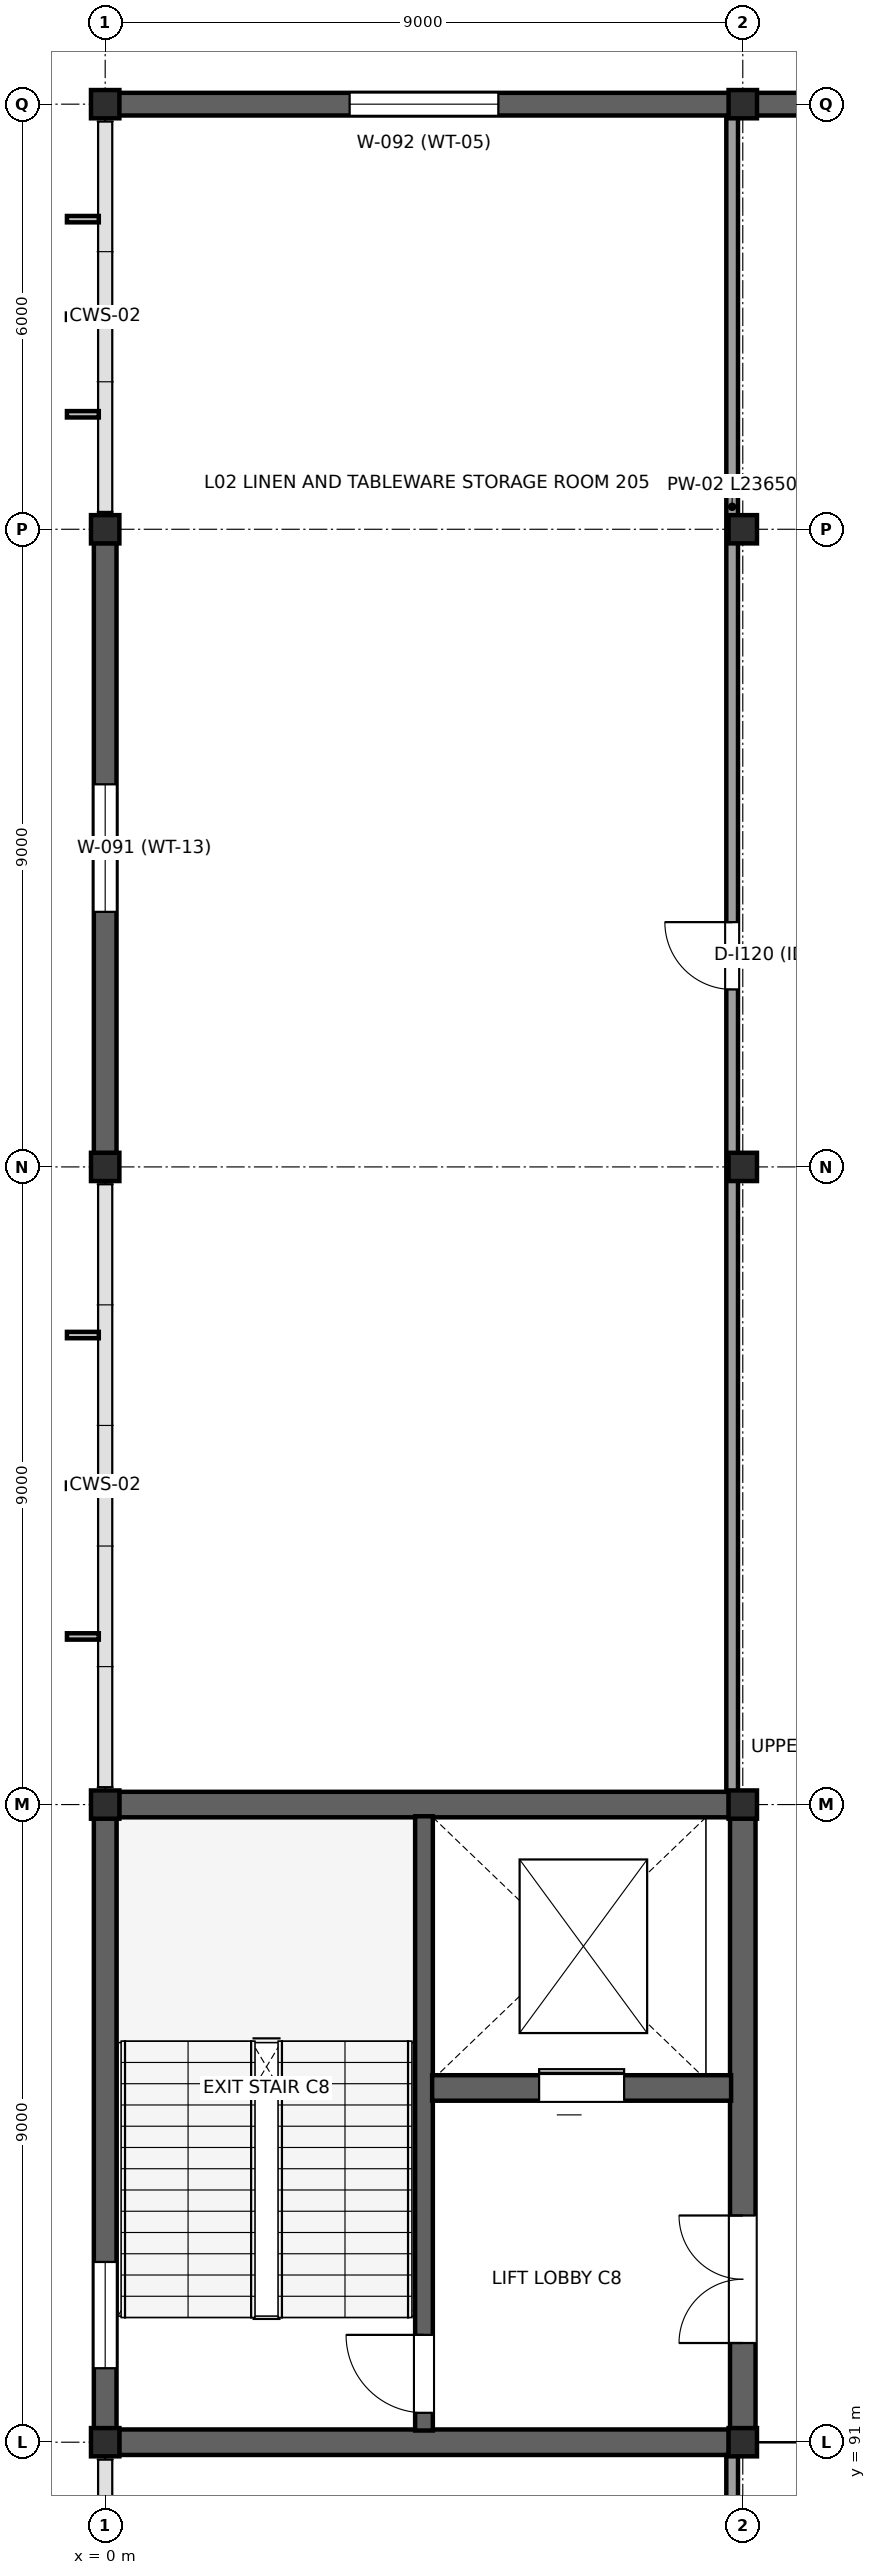
"""IFC4 building model, lengths in metres.
Left out: names, types, materials, properties, quantities, classifications, styles, units other than length and angle.
Written with IfcOpenShell. Run it as: python <this file> out.ifc"""

import sys

from ifc_helpers import new_model, si_unit, direction, frame, frame_2d, origin, origin_2d, place, context, subcontext, project, spatial, rectangle, i_section, extrude, element, fill, save


model = new_model("IFC4")
c1 = context("Model", 3, precision=1e-05, world=origin(), true_north=direction((0.0, 1.0)))
c2 = subcontext(c1, "Body", "Model", "MODEL_VIEW")
j1 = project(units=[si_unit("LENGTHUNIT", "METRE"), si_unit("PLANEANGLEUNIT", "RADIAN")], contexts=[c1])
p1 = place(None, origin())
s1 = spatial("IfcSite", under=j1, at=p1, CompositionType="ELEMENT")
p2 = place(p1, origin())
s2 = spatial("IfcBuilding", under=s1, at=p2, CompositionType="ELEMENT")
p3 = place(p2, frame((0.0, 0.0, 12.0)))
s3 = spatial("IfcBuildingStorey", under=s2, at=p3, CompositionType="ELEMENT", Elevation=12.0)
for number, where, z_axis, x_axis in (
    (1, (0.0, 91.0, 0.0), (0.0, 0.0, 1.0), (1.0, 0.0, 0.0)),
    (2, (0.0, 100.0, 0.0), (0.0, 0.0, 1.0), (1.0, 0.0, 0.0)),
    (3, (0.0, 109.0, 0.0), (0.0, 0.0, 1.0), (1.0, 0.0, 0.0)),
    (4, (0.0, 118.0, 0.0), (0.0, 0.0, 1.0), (1.0, 0.0, 0.0)),
    (5, (0.0, 124.0, 0.0), (0.0, 0.0, 1.0), (1.0, 0.0, 0.0)),
    (6, (9.0, 91.0, 0.0), (0.0, 0.0, 1.0), (1.0, 0.0, 0.0)),
    (7, (9.0, 100.0, 0.0), (0.0, 0.0, 1.0), (1.0, 0.0, 0.0)),
    (8, (9.0, 109.0, 0.0), (0.0, 0.0, 1.0), (1.0, 0.0, 0.0)),
    (9, (9.0, 118.0, 0.0), (0.0, 0.0, 1.0), (1.0, 0.0, 0.0)),
    (10, (9.0, 124.0, 0.0), (0.0, 0.0, 1.0), (1.0, 0.0, 0.0)),
):
    element("IfcColumn", number, at=place(p3, frame(where, z_axis=z_axis, x_axis=x_axis)), inside=s3, PredefinedType="COLUMN", context=c2, shape_type="SweptSolid", body=[
        extrude(i_section(OverallWidth=0.401, OverallDepth=0.399, WebThickness=0.025, FlangeThickness=0.04, at=origin_2d()), origin(), (0.0, 0.0, 1.0), 4.5),
    ])
p4 = place(p3, frame((0.0, 91.194, 0.0), z_axis=(0.0, 0.0, 1.0), x_axis=(0.0, 1.0, 0.0)))
e11 = element("IfcWall", 11, at=p4, inside=s3, PredefinedType="STANDARD", context=c2, shape_type="SweptSolid", body=[
    extrude(rectangle(XDim=8.612, YDim=0.32, at=frame_2d((4.306, 0.0))), origin(), (0.0, 0.0, 1.0), 4.28),
])
p5 = place(p4, frame((0.85, 0.0, 1.1)))
e12 = element("IfcOpeningElement", 12, at=p5, cuts=e11, PredefinedType="OPENING", context=c2, shape_type="SweptSolid", body=[
    extrude(rectangle(XDim=1.5, YDim=1.8, at=frame_2d((0.75, 0.9))), frame((0.0, 0.17, 0.0), z_axis=(0.0, -1.0, 0.0), x_axis=(1.0, 0.0, 0.0)), (0.0, 0.0, 1.0), 0.34),
])
p6 = place(p3, frame((0.0, 109.194, 0.0), z_axis=(0.0, 0.0, 1.0), x_axis=(0.0, 1.0, 0.0)))
e13 = element("IfcWall", 13, at=p6, inside=s3, PredefinedType="STANDARD", context=c2, shape_type="SweptSolid", body=[
    extrude(rectangle(XDim=8.612, YDim=0.32, at=frame_2d((4.306, 0.0))), origin(), (0.0, 0.0, 1.0), 4.28),
])
p7 = place(p6, frame((3.406, 0.0, 1.0)))
e14 = element("IfcOpeningElement", 14, at=p7, cuts=e13, PredefinedType="OPENING", context=c2, shape_type="SweptSolid", body=[
    extrude(rectangle(XDim=1.8, YDim=2.15, at=frame_2d((0.9, 1.075))), frame((0.0, 0.17, 0.0), z_axis=(0.0, -1.0, 0.0), x_axis=(1.0, 0.0, 0.0)), (0.0, 0.0, 1.0), 0.34),
])
p8 = place(p3, frame((0.019, 124.0, 0.0), z_axis=(0.0, 0.0, 1.0), x_axis=(1.0, 0.0, 0.0)))
e15 = element("IfcWall", 15, at=p8, inside=s3, PredefinedType="STANDARD", context=c2, shape_type="SweptSolid", body=[
    extrude(rectangle(XDim=8.962, YDim=0.32, at=frame_2d((4.481, 0.0))), origin(), (0.0, 0.0, 1.0), 4.28),
])
p9 = place(p8, frame((3.431, 0.0, 1.0)))
e16 = element("IfcOpeningElement", 16, at=p9, cuts=e15, PredefinedType="OPENING", context=c2, shape_type="SweptSolid", body=[
    extrude(rectangle(XDim=2.1, YDim=2.25, at=frame_2d((1.05, 1.125))), frame((0.0, 0.17, 0.0), z_axis=(0.0, -1.0, 0.0), x_axis=(1.0, 0.0, 0.0)), (0.0, 0.0, 1.0), 0.34),
])
p10 = place(p3, frame((9.019, 124.0, 0.0), z_axis=(0.0, 0.0, 1.0), x_axis=(1.0, 0.0, 0.0)))
e17 = element("IfcWall", 17, at=p10, inside=s3, PredefinedType="STANDARD", context=c2, shape_type="SweptSolid", body=[
    extrude(rectangle(XDim=8.962, YDim=0.32, at=frame_2d((4.481, 0.0))), origin(), (0.0, 0.0, 1.0), 4.28),
])
p11 = place(p10, frame((3.431, 0.0, 1.0)))
e18 = element("IfcOpeningElement", 18, at=p11, cuts=e17, PredefinedType="OPENING", context=c2, shape_type="SweptSolid", body=[
    extrude(rectangle(XDim=2.1, YDim=2.25, at=frame_2d((1.05, 1.125))), frame((0.0, 0.17, 0.0), z_axis=(0.0, -1.0, 0.0), x_axis=(1.0, 0.0, 0.0)), (0.0, 0.0, 1.0), 0.34),
])
p12 = place(p3, frame((9.0, 91.195, 0.0), z_axis=(0.0, 0.0, 1.0), x_axis=(0.0, 1.0, 0.0)))
e19 = element("IfcWall", 19, at=p12, inside=s3, PredefinedType="SHEAR", context=c2, shape_type="SweptSolid", body=[
    extrude(rectangle(XDim=8.61, YDim=0.36, at=frame_2d((4.305, 0.0))), origin(), (0.0, 0.0, 1.0), 4.28),
])
p13 = place(p12, frame((1.205, 0.0, 0.0)))
e20 = element("IfcOpeningElement", 20, at=p13, cuts=e19, PredefinedType="OPENING", context=c2, shape_type="SweptSolid", body=[
    extrude(rectangle(XDim=1.8, YDim=2.3, at=frame_2d((0.9, 1.15))), frame((0.0, 0.19, 0.0), z_axis=(0.0, -1.0, 0.0), x_axis=(1.0, 0.0, 0.0)), (0.0, 0.0, 1.0), 0.38),
])
for number, where, z_axis, x_axis in (
    (21, (0.196, 91.0, 0.0), (0.0, 0.0, 1.0), (1.0, 0.0, 0.0)),
    (22, (0.196, 100.0, 0.0), (0.0, 0.0, 1.0), (1.0, 0.0, 0.0)),
):
    element("IfcWall", number, at=place(p3, frame(where, z_axis=z_axis, x_axis=x_axis)), inside=s3, PredefinedType="SHEAR", context=c2, shape_type="SweptSolid", body=[
        extrude(rectangle(XDim=8.608, YDim=0.36, at=frame_2d((4.304, 0.0))), origin(), (0.0, 0.0, 1.0), 4.28),
    ])
p14 = place(p3, frame((4.5, 91.165, 0.0), z_axis=(0.0, 0.0, 1.0), x_axis=(0.0, 1.0, 0.0)))
e23 = element("IfcWall", 23, at=p14, inside=s3, PredefinedType="SHEAR", context=c2, shape_type="SweptSolid", body=[
    extrude(rectangle(XDim=8.67, YDim=0.25, at=frame_2d((4.335, 0.0))), origin(), (0.0, 0.0, 1.0), 4.28),
])
p15 = place(p14, frame((0.25, 0.0, 0.0)))
e24 = element("IfcOpeningElement", 24, at=p15, cuts=e23, PredefinedType="OPENING", context=c2, shape_type="SweptSolid", body=[
    extrude(rectangle(XDim=1.1, YDim=2.2, at=frame_2d((0.55, 1.1))), frame((0.0, 0.135, 0.0), z_axis=(0.0, -1.0, 0.0), x_axis=(1.0, 0.0, 0.0)), (0.0, 0.0, 1.0), 0.27),
])
p16 = place(p3, frame((4.615, 96.0, 0.0), z_axis=(0.0, 0.0, 1.0), x_axis=(1.0, 0.0, 0.0)))
e25 = element("IfcWall", 25, at=p16, inside=s3, PredefinedType="SHEAR", context=c2, shape_type="SweptSolid", body=[
    extrude(rectangle(XDim=4.22, YDim=0.36, at=frame_2d((2.11, 0.0))), origin(), (0.0, 0.0, 1.0), 4.28),
])
p17 = place(p16, frame((1.51, 0.0, 0.0)))
e26 = element("IfcOpeningElement", 26, at=p17, cuts=e25, PredefinedType="OPENING", context=c2, shape_type="SweptSolid", body=[
    extrude(rectangle(XDim=1.2, YDim=2.3, at=frame_2d((0.6, 1.15))), frame((0.0, 0.19, 0.0), z_axis=(0.0, -1.0, 0.0), x_axis=(1.0, 0.0, 0.0)), (0.0, 0.0, 1.0), 0.38),
])
p18 = place(p3, frame((8.85, 63.78, 0.0), z_axis=(0.0, 0.0, 1.0), x_axis=(0.0, 1.0, 0.0)))
e27 = element("IfcWall", 27, at=p18, inside=s3, PredefinedType="PARTITIONING", context=c2, shape_type="SweptSolid", body=[
    extrude(rectangle(XDim=27.04, YDim=0.165, at=frame_2d((13.52, 0.0))), origin(), (0.0, 0.0, 1.0), 3.6),
])
p19 = place(p18, frame((2.72, 0.0, 0.0)))
e28 = element("IfcOpeningElement", 28, at=p19, cuts=e27, PredefinedType="OPENING", context=c2, shape_type="SweptSolid", body=[
    extrude(rectangle(XDim=0.98, YDim=2.15, at=frame_2d((0.49, 1.075))), frame((0.0, 0.093, 0.0), z_axis=(0.0, -1.0, 0.0), x_axis=(1.0, 0.0, 0.0)), (0.0, 0.0, 1.0), 0.185),
])
p20 = place(p18, frame((9.72, 0.0, 0.0)))
e29 = element("IfcOpeningElement", 29, at=p20, cuts=e27, PredefinedType="OPENING", context=c2, shape_type="SweptSolid", body=[
    extrude(rectangle(XDim=1.02, YDim=2.16, at=frame_2d((0.51, 1.08))), frame((0.0, 0.093, 0.0), z_axis=(0.0, -1.0, 0.0), x_axis=(1.0, 0.0, 0.0)), (0.0, 0.0, 1.0), 0.185),
])
p21 = place(p18, frame((14.72, 0.0, 0.0)))
e30 = element("IfcOpeningElement", 30, at=p21, cuts=e27, PredefinedType="OPENING", context=c2, shape_type="SweptSolid", body=[
    extrude(rectangle(XDim=0.95, YDim=2.12, at=frame_2d((0.475, 1.06))), frame((0.0, 0.093, 0.0), z_axis=(0.0, -1.0, 0.0), x_axis=(1.0, 0.0, 0.0)), (0.0, 0.0, 1.0), 0.185),
])
p22 = place(p3, frame((8.85, 100.18, 0.0), z_axis=(0.0, 0.0, 1.0), x_axis=(0.0, 1.0, 0.0)))
e31 = element("IfcWall", 31, at=p22, inside=s3, PredefinedType="PARTITIONING", context=c2, shape_type="SweptSolid", body=[
    extrude(rectangle(XDim=23.65, YDim=0.165, at=frame_2d((11.825, 0.0))), origin(), (0.0, 0.0, 1.0), 3.6),
])
p23 = place(p22, frame((11.325, 0.0, 0.0)))
e32 = element("IfcOpeningElement", 32, at=p23, cuts=e31, PredefinedType="OPENING", context=c2, shape_type="SweptSolid", body=[
    extrude(rectangle(XDim=0.95, YDim=2.12, at=frame_2d((0.475, 1.06))), frame((0.0, 0.093, 0.0), z_axis=(0.0, -1.0, 0.0), x_axis=(1.0, 0.0, 0.0)), (0.0, 0.0, 1.0), 0.185),
])
p24 = place(p5, origin())
e33 = element("IfcWindow", 33, at=p24, inside=s3, PartitioningType="SINGLE_PANEL", PredefinedType="WINDOW", context=c2, shape_type="SweptSolid", body=[
    extrude(rectangle(XDim=1.5, YDim=1.8, at=frame_2d((0.75, 0.9))), frame((0.0, 0.03, 0.0), z_axis=(0.0, -1.0, 0.0), x_axis=(1.0, 0.0, 0.0)), (0.0, 0.0, 1.0), 0.06),
])
fill(e12, e33)
p25 = place(p7, origin())
e34 = element("IfcWindow", 34, at=p25, inside=s3, PartitioningType="SINGLE_PANEL", PredefinedType="WINDOW", context=c2, shape_type="SweptSolid", body=[
    extrude(rectangle(XDim=1.8, YDim=2.15, at=frame_2d((0.9, 1.075))), frame((0.0, 0.03, 0.0), z_axis=(0.0, -1.0, 0.0), x_axis=(1.0, 0.0, 0.0)), (0.0, 0.0, 1.0), 0.06),
])
fill(e14, e34)
p26 = place(p9, origin())
e35 = element("IfcWindow", 35, at=p26, inside=s3, PartitioningType="SINGLE_PANEL", PredefinedType="WINDOW", context=c2, shape_type="SweptSolid", body=[
    extrude(rectangle(XDim=2.1, YDim=2.25, at=frame_2d((1.05, 1.125))), frame((0.0, 0.03, 0.0), z_axis=(0.0, -1.0, 0.0), x_axis=(1.0, 0.0, 0.0)), (0.0, 0.0, 1.0), 0.06),
])
fill(e16, e35)
p27 = place(p15, origin())
e36 = element("IfcDoor", 36, at=p27, inside=s3, OperationType="SINGLE_SWING_RIGHT", PredefinedType="DOOR", context=c2, shape_type="SweptSolid", body=[
    extrude(rectangle(XDim=1.1, YDim=2.2, at=frame_2d((0.55, 1.1))), frame((0.0, 0.025, 0.0), z_axis=(0.0, -1.0, 0.0), x_axis=(1.0, 0.0, 0.0)), (0.0, 0.0, 1.0), 0.05),
])
fill(e24, e36)
p28 = place(p17, origin())
e37 = element("IfcDoor", 37, at=p28, inside=s3, OperationType="SLIDING_TO_LEFT", PredefinedType="DOOR", context=c2, shape_type="SweptSolid", body=[
    extrude(rectangle(XDim=1.2, YDim=2.3, at=frame_2d((0.6, 1.15))), frame((0.0, 0.025, 0.0), z_axis=(0.0, -1.0, 0.0), x_axis=(1.0, 0.0, 0.0)), (0.0, 0.0, 1.0), 0.05),
])
fill(e26, e37)
p29 = place(p13, origin())
e38 = element("IfcDoor", 38, at=p29, inside=s3, OperationType="DOUBLE_DOOR_SINGLE_SWING", PredefinedType="DOOR", context=c2, shape_type="SweptSolid", body=[
    extrude(rectangle(XDim=1.8, YDim=2.3, at=frame_2d((0.9, 1.15))), frame((0.0, 0.025, 0.0), z_axis=(0.0, -1.0, 0.0), x_axis=(1.0, 0.0, 0.0)), (0.0, 0.0, 1.0), 0.05),
])
fill(e20, e38)
p30 = place(p23, origin())
e39 = element("IfcDoor", 39, at=p30, inside=s3, OperationType="SINGLE_SWING_RIGHT", PredefinedType="DOOR", context=c2, shape_type="SweptSolid", body=[
    extrude(rectangle(XDim=0.95, YDim=2.12, at=frame_2d((0.475, 1.06))), frame((0.0, 0.025, 0.0), z_axis=(0.0, -1.0, 0.0), x_axis=(1.0, 0.0, 0.0)), (0.0, 0.0, 1.0), 0.05),
])
fill(e32, e39)
save(model, sys.argv[1])
